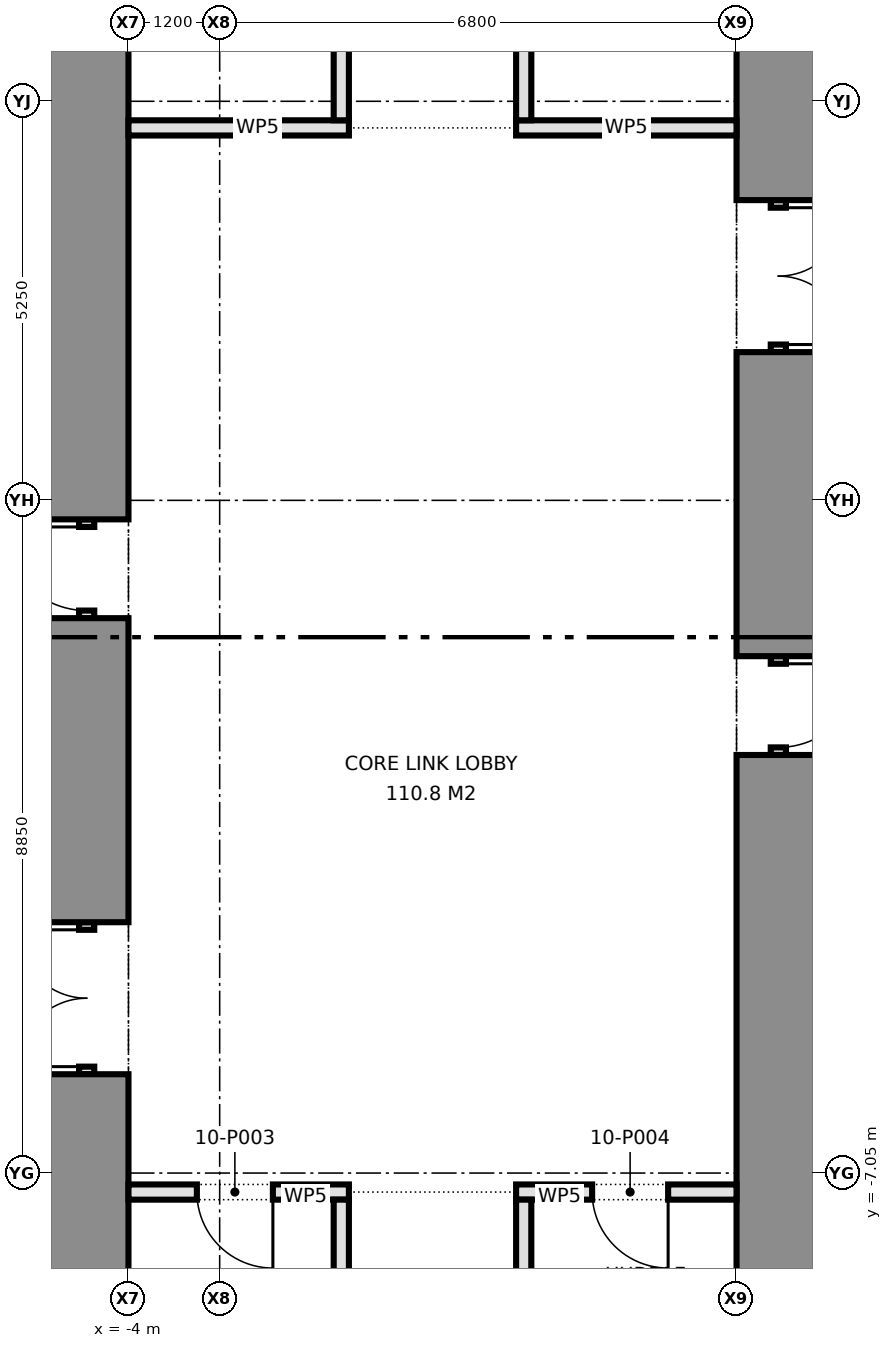
"""IFC4 building model, lengths in metres.
Left out: names, types, materials, properties, quantities, classifications, styles, units other than length and angle.
Written with IfcOpenShell. Run it as: python <this file> out.ifc"""

import sys

from ifc_helpers import new_model, si_unit, direction, frame, frame_2d, origin, place, context, subcontext, project, spatial, rectangle, extrude, element, fill, save


model = new_model("IFC4")
c1 = context("Model", 3, precision=1e-05, world=origin(), true_north=direction((0.0, 1.0)))
c2 = subcontext(c1, "Body", "Model", "MODEL_VIEW")
j1 = project(units=[si_unit("LENGTHUNIT", "METRE"), si_unit("PLANEANGLEUNIT", "RADIAN")], contexts=[c1])
p1 = place(None, origin())
s1 = spatial("IfcSite", under=j1, at=p1, CompositionType="ELEMENT")
p2 = place(p1, origin())
s2 = spatial("IfcBuilding", under=s1, at=p2, CompositionType="ELEMENT")
p3 = place(p2, frame((0.0, 0.0, 44.9)))
s3 = spatial("IfcBuildingStorey", under=s2, at=p3, CompositionType="ELEMENT", Elevation=44.9)
p4 = place(p3, frame((-4.55, -8.9, 0.0), z_axis=(0.0, 0.0, 1.0), x_axis=(0.0, 1.0, 0.0)))
e1 = element("IfcWall", 1, at=p4, inside=s3, PredefinedType="SHEAR", context=c2, shape_type="SweptSolid", body=[
    extrude(rectangle(XDim=3.15, YDim=1.1, at=frame_2d((1.575, 0.0))), origin(), (0.0, 0.0, 1.0), 4.575),
])
p5 = place(p3, frame((-4.55, -5.75, 0.0), z_axis=(0.0, 0.0, 1.0), x_axis=(0.0, 1.0, 0.0)))
e2 = element("IfcWall", 2, at=p5, inside=s3, PredefinedType="PARTITIONING", context=c2, shape_type="SweptSolid", body=[
    extrude(rectangle(XDim=2.0, YDim=0.2, at=frame_2d((1.0, 0.0))), origin(), (0.0, 0.0, 1.0), 2.4),
])
p6 = place(p5, frame((0.1, 0.0, 0.0)))
e3 = element("IfcOpeningElement", 3, at=p6, cuts=e2, PredefinedType="OPENING", context=c2, shape_type="SweptSolid", body=[
    extrude(rectangle(XDim=1.8, YDim=2.1, at=frame_2d((0.9, 1.05))), frame((0.0, 0.11, 0.0), z_axis=(0.0, -1.0, 0.0), x_axis=(1.0, 0.0, 0.0)), (0.0, 0.0, 1.0), 0.22),
])
p7 = place(p3, frame((-4.55, -3.75, 0.0), z_axis=(0.0, 0.0, 1.0), x_axis=(0.0, 1.0, 0.0)))
e4 = element("IfcWall", 4, at=p7, inside=s3, PredefinedType="SHEAR", context=c2, shape_type="SweptSolid", body=[
    extrude(rectangle(XDim=4.0, YDim=1.1, at=frame_2d((2.0, 0.0))), origin(), (0.0, 0.0, 1.0), 4.575),
])
p8 = place(p3, frame((-4.55, 0.25, 0.0), z_axis=(0.0, 0.0, 1.0), x_axis=(0.0, 1.0, 0.0)))
e5 = element("IfcWall", 5, at=p8, inside=s3, PredefinedType="PARTITIONING", context=c2, shape_type="SweptSolid", body=[
    extrude(rectangle(XDim=1.3, YDim=0.2, at=frame_2d((0.65, 0.0))), origin(), (0.0, 0.0, 1.0), 2.4),
])
p9 = place(p8, frame((0.1, 0.0, 0.0)))
e6 = element("IfcOpeningElement", 6, at=p9, cuts=e5, PredefinedType="OPENING", context=c2, shape_type="SweptSolid", body=[
    extrude(rectangle(XDim=1.1, YDim=2.1, at=frame_2d((0.55, 1.05))), frame((0.0, 0.11, 0.0), z_axis=(0.0, -1.0, 0.0), x_axis=(1.0, 0.0, 0.0)), (0.0, 0.0, 1.0), 0.22),
])
p10 = place(p3, frame((-4.55, 1.55, 0.0), z_axis=(0.0, 0.0, 1.0), x_axis=(0.0, 1.0, 0.0)))
e7 = element("IfcWall", 7, at=p10, inside=s3, PredefinedType="SHEAR", context=c2, shape_type="SweptSolid", body=[
    extrude(rectangle(XDim=7.35, YDim=1.1, at=frame_2d((3.675, 0.0))), origin(), (0.0, 0.0, 1.0), 4.575),
])
p11 = place(p3, frame((4.55, 8.9, 0.0), z_axis=(0.0, 0.0, 1.0), x_axis=(0.0, -1.0, 0.0)))
e8 = element("IfcWall", 8, at=p11, inside=s3, PredefinedType="SHEAR", context=c2, shape_type="SweptSolid", body=[
    extrude(rectangle(XDim=3.15, YDim=1.1, at=frame_2d((1.575, 0.0))), origin(), (0.0, 0.0, 1.0), 4.575),
])
p12 = place(p3, frame((4.55, 5.75, 0.0), z_axis=(0.0, 0.0, 1.0), x_axis=(0.0, -1.0, 0.0)))
e9 = element("IfcWall", 9, at=p12, inside=s3, PredefinedType="PARTITIONING", context=c2, shape_type="SweptSolid", body=[
    extrude(rectangle(XDim=2.0, YDim=0.2, at=frame_2d((1.0, 0.0))), origin(), (0.0, 0.0, 1.0), 2.4),
])
p13 = place(p12, frame((0.1, 0.0, 0.0)))
e10 = element("IfcOpeningElement", 10, at=p13, cuts=e9, PredefinedType="OPENING", context=c2, shape_type="SweptSolid", body=[
    extrude(rectangle(XDim=1.8, YDim=2.1, at=frame_2d((0.9, 1.05))), frame((0.0, 0.11, 0.0), z_axis=(0.0, -1.0, 0.0), x_axis=(1.0, 0.0, 0.0)), (0.0, 0.0, 1.0), 0.22),
])
p14 = place(p3, frame((4.55, 3.75, 0.0), z_axis=(0.0, 0.0, 1.0), x_axis=(0.0, -1.0, 0.0)))
e11 = element("IfcWall", 11, at=p14, inside=s3, PredefinedType="SHEAR", context=c2, shape_type="SweptSolid", body=[
    extrude(rectangle(XDim=4.0, YDim=1.1, at=frame_2d((2.0, 0.0))), origin(), (0.0, 0.0, 1.0), 4.575),
])
p15 = place(p3, frame((4.55, -0.25, 0.0), z_axis=(0.0, 0.0, 1.0), x_axis=(0.0, -1.0, 0.0)))
e12 = element("IfcWall", 12, at=p15, inside=s3, PredefinedType="PARTITIONING", context=c2, shape_type="SweptSolid", body=[
    extrude(rectangle(XDim=1.3, YDim=0.2, at=frame_2d((0.65, 0.0))), origin(), (0.0, 0.0, 1.0), 2.4),
])
p16 = place(p15, frame((0.1, 0.0, 0.0)))
e13 = element("IfcOpeningElement", 13, at=p16, cuts=e12, PredefinedType="OPENING", context=c2, shape_type="SweptSolid", body=[
    extrude(rectangle(XDim=1.1, YDim=2.1, at=frame_2d((0.55, 1.05))), frame((0.0, 0.11, 0.0), z_axis=(0.0, -1.0, 0.0), x_axis=(1.0, 0.0, 0.0)), (0.0, 0.0, 1.0), 0.22),
])
p17 = place(p3, frame((4.55, -1.55, 0.0), z_axis=(0.0, 0.0, 1.0), x_axis=(0.0, -1.0, 0.0)))
e14 = element("IfcWall", 14, at=p17, inside=s3, PredefinedType="SHEAR", context=c2, shape_type="SweptSolid", body=[
    extrude(rectangle(XDim=7.35, YDim=1.1, at=frame_2d((3.675, 0.0))), origin(), (0.0, 0.0, 1.0), 4.575),
])
p18 = place(p3, frame((-4.0, -7.3, 0.0), z_axis=(0.0, 0.0, 1.0), x_axis=(1.0, 0.0, 0.0)))
e15 = element("IfcWall", 15, at=p18, inside=s3, PredefinedType="PARTITIONING", context=c2, shape_type="SweptSolid", body=[
    extrude(rectangle(XDim=2.9, YDim=0.2, at=frame_2d((1.45, 0.0))), origin(), (0.0, 0.0, 1.0), 4.575),
])
p19 = place(p18, frame((0.9, 0.0, 0.0)))
e16 = element("IfcOpeningElement", 16, at=p19, cuts=e15, PredefinedType="OPENING", context=c2, shape_type="SweptSolid", body=[
    extrude(rectangle(XDim=1.0, YDim=2.1, at=frame_2d((0.5, 1.05))), frame((0.0, 0.11, 0.0), z_axis=(0.0, -1.0, 0.0), x_axis=(1.0, 0.0, 0.0)), (0.0, 0.0, 1.0), 0.22),
])
p20 = place(p3, frame((1.1, -7.3, 0.0), z_axis=(0.0, 0.0, 1.0), x_axis=(1.0, 0.0, 0.0)))
e17 = element("IfcWall", 17, at=p20, inside=s3, PredefinedType="PARTITIONING", context=c2, shape_type="SweptSolid", body=[
    extrude(rectangle(XDim=2.9, YDim=0.2, at=frame_2d((1.45, 0.0))), origin(), (0.0, 0.0, 1.0), 4.575),
])
p21 = place(p20, frame((1.0, 0.0, 0.0)))
e18 = element("IfcOpeningElement", 18, at=p21, cuts=e17, PredefinedType="OPENING", context=c2, shape_type="SweptSolid", body=[
    extrude(rectangle(XDim=1.0, YDim=2.1, at=frame_2d((0.5, 1.05))), frame((0.0, 0.11, 0.0), z_axis=(0.0, -1.0, 0.0), x_axis=(1.0, 0.0, 0.0)), (0.0, 0.0, 1.0), 0.22),
])
for number, where, z_axis, x_axis in (
    (19, (-4.0, 6.7, 0.0), (0.0, 0.0, 1.0), (1.0, 0.0, 0.0)),
    (20, (1.1, 6.7, 0.0), (0.0, 0.0, 1.0), (1.0, 0.0, 0.0)),
):
    element("IfcWall", number, at=place(p3, frame(where, z_axis=z_axis, x_axis=x_axis)), inside=s3, PredefinedType="PARTITIONING", context=c2, shape_type="SweptSolid", body=[
        extrude(rectangle(XDim=2.9, YDim=0.2, at=frame_2d((1.45, 0.0))), origin(), (0.0, 0.0, 1.0), 4.575),
    ])
p22 = place(p3, frame((1.2, -9.9, 0.0), z_axis=(0.0, 0.0, 1.0), x_axis=(0.0, 1.0, 0.0)))
e21 = element("IfcWall", 21, at=p22, inside=s3, PredefinedType="PARTITIONING", context=c2, shape_type="SweptSolid", body=[
    extrude(rectangle(XDim=2.5, YDim=0.2, at=frame_2d((1.25, 0.0))), origin(), (0.0, 0.0, 1.0), 4.575),
])
p23 = place(p3, frame((1.2, 6.8, 0.0), z_axis=(0.0, 0.0, 1.0), x_axis=(0.0, 1.0, 0.0)))
e22 = element("IfcWall", 22, at=p23, inside=s3, PredefinedType="PARTITIONING", context=c2, shape_type="SweptSolid", body=[
    extrude(rectangle(XDim=3.1, YDim=0.2, at=frame_2d((1.55, 0.0))), origin(), (0.0, 0.0, 1.0), 4.575),
])
p24 = place(p23, frame((1.05, 0.0, 0.0)))
e23 = element("IfcOpeningElement", 23, at=p24, cuts=e22, PredefinedType="OPENING", context=c2, shape_type="SweptSolid", body=[
    extrude(rectangle(XDim=1.0, YDim=2.1, at=frame_2d((0.5, 1.05))), frame((0.0, 0.11, 0.0), z_axis=(0.0, -1.0, 0.0), x_axis=(1.0, 0.0, 0.0)), (0.0, 0.0, 1.0), 0.22),
])
p25 = place(p3, frame((-1.2, -9.9, 0.0), z_axis=(0.0, 0.0, 1.0), x_axis=(0.0, 1.0, 0.0)))
e24 = element("IfcWall", 24, at=p25, inside=s3, PredefinedType="PARTITIONING", context=c2, shape_type="SweptSolid", body=[
    extrude(rectangle(XDim=2.5, YDim=0.2, at=frame_2d((1.25, 0.0))), origin(), (0.0, 0.0, 1.0), 4.575),
])
p26 = place(p3, frame((-1.2, 6.8, 0.0), z_axis=(0.0, 0.0, 1.0), x_axis=(0.0, 1.0, 0.0)))
e25 = element("IfcWall", 25, at=p26, inside=s3, PredefinedType="PARTITIONING", context=c2, shape_type="SweptSolid", body=[
    extrude(rectangle(XDim=3.1, YDim=0.2, at=frame_2d((1.55, 0.0))), origin(), (0.0, 0.0, 1.0), 4.575),
])
p27 = place(p26, frame((1.05, 0.0, 0.0)))
e26 = element("IfcOpeningElement", 26, at=p27, cuts=e25, PredefinedType="OPENING", context=c2, shape_type="SweptSolid", body=[
    extrude(rectangle(XDim=1.0, YDim=2.1, at=frame_2d((0.5, 1.05))), frame((0.0, 0.11, 0.0), z_axis=(0.0, -1.0, 0.0), x_axis=(1.0, 0.0, 0.0)), (0.0, 0.0, 1.0), 0.22),
])
p28 = place(p6, origin())
e27 = element("IfcDoor", 27, at=p28, inside=s3, OperationType="DOUBLE_DOOR_SINGLE_SWING", PredefinedType="DOOR", context=c2, shape_type="SweptSolid", body=[
    extrude(rectangle(XDim=1.8, YDim=2.1, at=frame_2d((0.9, 1.05))), frame((0.0, 0.025, 0.0), z_axis=(0.0, -1.0, 0.0), x_axis=(1.0, 0.0, 0.0)), (0.0, 0.0, 1.0), 0.05),
])
fill(e3, e27)
p29 = place(p9, origin())
e28 = element("IfcDoor", 28, at=p29, inside=s3, OperationType="SINGLE_SWING_RIGHT", PredefinedType="DOOR", context=c2, shape_type="SweptSolid", body=[
    extrude(rectangle(XDim=1.1, YDim=2.1, at=frame_2d((0.55, 1.05))), frame((0.0, 0.025, 0.0), z_axis=(0.0, -1.0, 0.0), x_axis=(1.0, 0.0, 0.0)), (0.0, 0.0, 1.0), 0.05),
])
fill(e6, e28)
p30 = place(p13, origin())
e29 = element("IfcDoor", 29, at=p30, inside=s3, OperationType="DOUBLE_DOOR_SINGLE_SWING", PredefinedType="DOOR", context=c2, shape_type="SweptSolid", body=[
    extrude(rectangle(XDim=1.8, YDim=2.1, at=frame_2d((0.9, 1.05))), frame((0.0, 0.025, 0.0), z_axis=(0.0, -1.0, 0.0), x_axis=(1.0, 0.0, 0.0)), (0.0, 0.0, 1.0), 0.05),
])
fill(e10, e29)
p31 = place(p16, origin())
e30 = element("IfcDoor", 30, at=p31, inside=s3, OperationType="SINGLE_SWING_LEFT", PredefinedType="DOOR", context=c2, shape_type="SweptSolid", body=[
    extrude(rectangle(XDim=1.1, YDim=2.1, at=frame_2d((0.55, 1.05))), frame((0.0, 0.025, 0.0), z_axis=(0.0, -1.0, 0.0), x_axis=(1.0, 0.0, 0.0)), (0.0, 0.0, 1.0), 0.05),
])
fill(e13, e30)
p32 = place(p19, frame((1.0, 0.0, 0.0), z_axis=(0.0, 0.0, 1.0), x_axis=(-1.0, 0.0, 0.0)))
e31 = element("IfcDoor", 31, at=p32, inside=s3, OperationType="SINGLE_SWING_LEFT", PredefinedType="DOOR", context=c2, shape_type="SweptSolid", body=[
    extrude(rectangle(XDim=1.0, YDim=2.1, at=frame_2d((0.5, 1.05))), frame((0.0, 0.025, 0.0), z_axis=(0.0, -1.0, 0.0), x_axis=(1.0, 0.0, 0.0)), (0.0, 0.0, 1.0), 0.05),
])
fill(e16, e31)
p33 = place(p21, frame((1.0, 0.0, 0.0), z_axis=(0.0, 0.0, 1.0), x_axis=(-1.0, 0.0, 0.0)))
e32 = element("IfcDoor", 32, at=p33, inside=s3, OperationType="SINGLE_SWING_LEFT", PredefinedType="DOOR", context=c2, shape_type="SweptSolid", body=[
    extrude(rectangle(XDim=1.0, YDim=2.1, at=frame_2d((0.5, 1.05))), frame((0.0, 0.025, 0.0), z_axis=(0.0, -1.0, 0.0), x_axis=(1.0, 0.0, 0.0)), (0.0, 0.0, 1.0), 0.05),
])
fill(e18, e32)
save(model, sys.argv[1])
